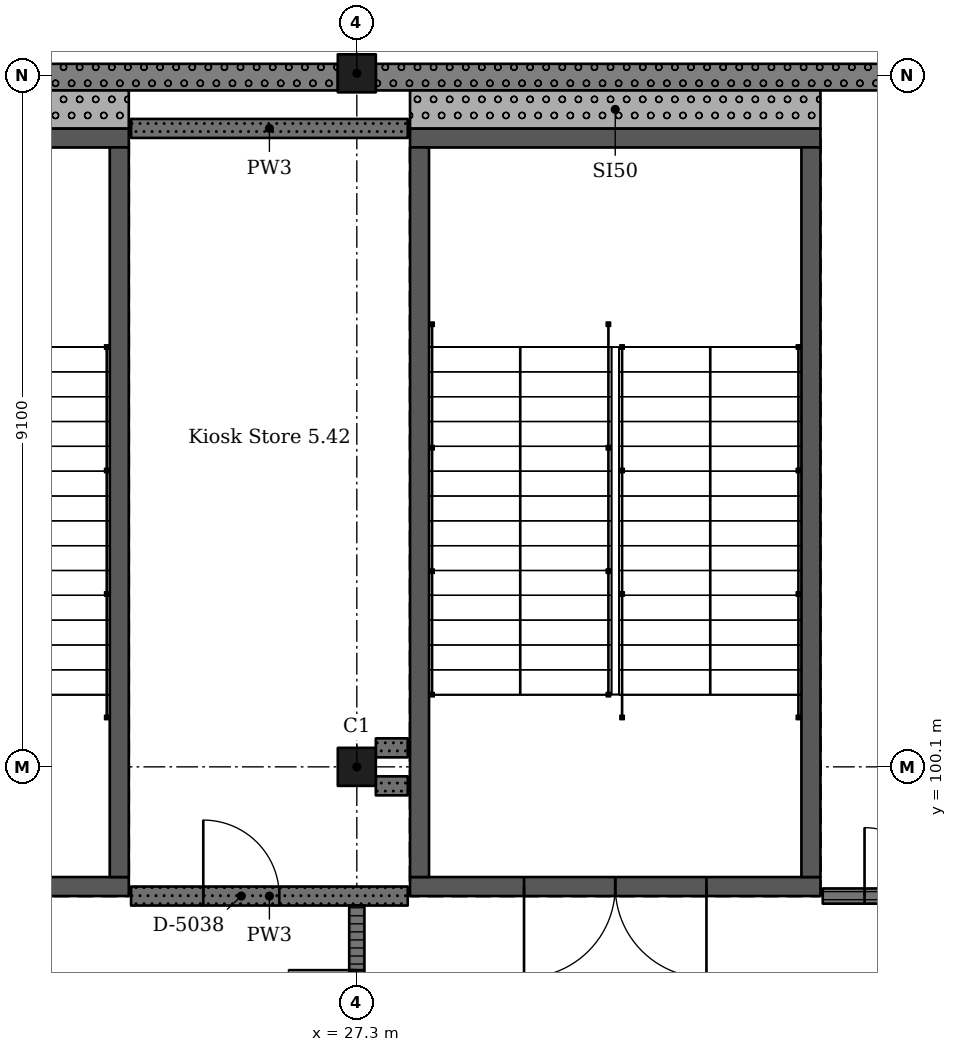
"""IFC4 building model, lengths in metres.
Left out: names, types, materials, properties, quantities, classifications, styles, units other than length and angle.
Written with IfcOpenShell. Run it as: python <this file> out.ifc"""

import sys

from ifc_helpers import new_model, si_unit, direction, frame, frame_2d, origin, origin_2d, place, context, subcontext, project, spatial, rectangle, extrude, element, fill, save


model = new_model("IFC4")
c1 = context("Model", 3, precision=1e-05, world=origin(), true_north=direction((0.0, 1.0)))
c2 = subcontext(c1, "Body", "Model", "MODEL_VIEW")
j1 = project(units=[si_unit("LENGTHUNIT", "METRE"), si_unit("PLANEANGLEUNIT", "RADIAN")], contexts=[c1])
p1 = place(None, origin())
s1 = spatial("IfcSite", under=j1, at=p1, CompositionType="ELEMENT")
p2 = place(p1, origin())
s2 = spatial("IfcBuilding", under=s1, at=p2, CompositionType="ELEMENT")
p3 = place(p2, frame((0.0, 0.0, 24.57)))
s3 = spatial("IfcBuildingStorey", under=s2, at=p3, CompositionType="ELEMENT", Elevation=24.57)
for number, where, z_axis, x_axis in (
    (1, (27.3, 100.1, 0.0), (0.0, 0.0, 1.0), (1.0, 0.0, 0.0)),
    (2, (27.3, 109.225, 0.0), (0.0, 0.0, 1.0), (1.0, 0.0, 0.0)),
):
    element("IfcColumn", number, at=place(p3, frame(where, z_axis=z_axis, x_axis=x_axis)), inside=s3, PredefinedType="COLUMN", context=c2, shape_type="SweptSolid", body=[
        extrude(rectangle(XDim=0.5, YDim=0.5, at=origin_2d()), origin(), (0.0, 0.0, 1.0), 4.55),
    ])
p4 = place(p3, frame((24.3, 98.525, 0.0), z_axis=(0.0, 0.0, 1.0), x_axis=(-1.0, 0.0, 0.0)))
e3 = element("IfcWall", 3, at=p4, inside=s3, PredefinedType="SHEAR", context=c2, shape_type="SweptSolid", body=[
    extrude(rectangle(XDim=5.4, YDim=0.25, at=frame_2d((2.7, 0.0))), origin(), (0.0, 0.0, 1.0), 4.55),
])
p5 = place(p4, frame((1.5, 0.0, 0.0)))
e4 = element("IfcOpeningElement", 4, at=p5, cuts=e3, PredefinedType="OPENING", context=c2, shape_type="SweptSolid", body=[
    extrude(rectangle(XDim=2.4, YDim=2.1, at=frame_2d((1.2, 1.05))), frame((0.0, 0.135, 0.0), z_axis=(0.0, -1.0, 0.0), x_axis=(1.0, 0.0, 0.0)), (0.0, 0.0, 1.0), 0.27),
])
p6 = place(p3, frame((24.3, 108.375, 0.0), z_axis=(0.0, 0.0, 1.0), x_axis=(-1.0, 0.0, 0.0)))
e5 = element("IfcWall", 5, at=p6, inside=s3, PredefinedType="SHEAR", context=c2, shape_type="SweptSolid", body=[
    extrude(rectangle(XDim=5.4, YDim=0.25, at=frame_2d((2.7, 0.0))), origin(), (0.0, 0.0, 1.0), 4.55),
])
p7 = place(p3, frame((24.175, 108.25, 0.0), z_axis=(0.0, 0.0, 1.0), x_axis=(0.0, -1.0, 0.0)))
e6 = element("IfcWall", 6, at=p7, inside=s3, PredefinedType="SHEAR", context=c2, shape_type="SweptSolid", body=[
    extrude(rectangle(XDim=9.6, YDim=0.25, at=frame_2d((4.8, 0.0))), origin(), (0.0, 0.0, 1.0), 4.55),
])
p8 = place(p3, frame((33.4, 98.525, 0.0), z_axis=(0.0, 0.0, 1.0), x_axis=(-1.0, 0.0, 0.0)))
e7 = element("IfcWall", 7, at=p8, inside=s3, PredefinedType="SHEAR", context=c2, shape_type="SweptSolid", body=[
    extrude(rectangle(XDim=5.4, YDim=0.25, at=frame_2d((2.7, 0.0))), origin(), (0.0, 0.0, 1.0), 4.55),
])
p9 = place(p8, frame((1.5, 0.0, 0.0)))
e8 = element("IfcOpeningElement", 8, at=p9, cuts=e7, PredefinedType="OPENING", context=c2, shape_type="SweptSolid", body=[
    extrude(rectangle(XDim=2.4, YDim=2.1, at=frame_2d((1.2, 1.05))), frame((0.0, 0.135, 0.0), z_axis=(0.0, -1.0, 0.0), x_axis=(1.0, 0.0, 0.0)), (0.0, 0.0, 1.0), 0.27),
])
p10 = place(p3, frame((33.4, 108.375, 0.0), z_axis=(0.0, 0.0, 1.0), x_axis=(-1.0, 0.0, 0.0)))
e9 = element("IfcWall", 9, at=p10, inside=s3, PredefinedType="SHEAR", context=c2, shape_type="SweptSolid", body=[
    extrude(rectangle(XDim=5.4, YDim=0.25, at=frame_2d((2.7, 0.0))), origin(), (0.0, 0.0, 1.0), 4.55),
])
for number, where, z_axis, x_axis in (
    (10, (28.125, 108.25, 0.0), (0.0, 0.0, 1.0), (0.0, -1.0, 0.0)),
    (11, (33.275, 108.25, 0.0), (0.0, 0.0, 1.0), (0.0, -1.0, 0.0)),
):
    element("IfcWall", number, at=place(p3, frame(where, z_axis=z_axis, x_axis=x_axis)), inside=s3, PredefinedType="SHEAR", context=c2, shape_type="SweptSolid", body=[
        extrude(rectangle(XDim=9.6, YDim=0.25, at=frame_2d((4.8, 0.0))), origin(), (0.0, 0.0, 1.0), 4.55),
    ])
p11 = place(p3, frame((36.15, 109.175, 0.0), z_axis=(0.0, 0.0, 1.0), x_axis=(-1.0, 0.0, 0.0)))
e12 = element("IfcWall", 12, at=p11, inside=s3, PredefinedType="SOLIDWALL", context=c2, shape_type="SweptSolid", body=[
    extrude(rectangle(XDim=8.6, YDim=0.35, at=frame_2d((4.3, 0.0))), origin(), (0.0, 0.0, 1.0), 3.6),
])
p12 = place(p3, frame((27.05, 109.175, 0.0), z_axis=(0.0, 0.0, 1.0), x_axis=(-1.0, 0.0, 0.0)))
e13 = element("IfcWall", 13, at=p12, inside=s3, PredefinedType="SOLIDWALL", context=c2, shape_type="SweptSolid", body=[
    extrude(rectangle(XDim=8.6, YDim=0.35, at=frame_2d((4.3, 0.0))), origin(), (0.0, 0.0, 1.0), 3.6),
])
p13 = place(p3, frame((18.9, 108.75, 0.0), z_axis=(0.0, 0.0, 1.0), x_axis=(1.0, 0.0, 0.0)))
e14 = element("IfcWall", 14, at=p13, inside=s3, PredefinedType="SOLIDWALL", context=c2, shape_type="SweptSolid", body=[
    extrude(rectangle(XDim=5.4, YDim=0.5, at=frame_2d((2.7, 0.0))), origin(), (0.0, 0.0, 1.0), 4.35),
])
p14 = place(p3, frame((28.0, 108.75, 0.0), z_axis=(0.0, 0.0, 1.0), x_axis=(1.0, 0.0, 0.0)))
e15 = element("IfcWall", 15, at=p14, inside=s3, PredefinedType="SOLIDWALL", context=c2, shape_type="SweptSolid", body=[
    extrude(rectangle(XDim=5.4, YDim=0.5, at=frame_2d((2.7, 0.0))), origin(), (0.0, 0.0, 1.0), 4.35),
])
p15 = place(p3, frame((24.33, 98.4, 0.0), z_axis=(0.0, 0.0, 1.0), x_axis=(1.0, 0.0, 0.0)))
e16 = element("IfcWall", 16, at=p15, inside=s3, PredefinedType="SOLIDWALL", context=c2, shape_type="SweptSolid", body=[
    extrude(rectangle(XDim=3.64, YDim=0.25, at=frame_2d((1.82, 0.0))), origin(), (0.0, 0.0, 1.0), 4.35),
])
p16 = place(p15, frame((0.95, 0.0, 0.0)))
e17 = element("IfcOpeningElement", 17, at=p16, cuts=e16, PredefinedType="OPENING", context=c2, shape_type="SweptSolid", body=[
    extrude(rectangle(XDim=1.0, YDim=2.1, at=frame_2d((0.5, 1.05))), frame((0.0, 0.135, 0.0), z_axis=(0.0, -1.0, 0.0), x_axis=(1.0, 0.0, 0.0)), (0.0, 0.0, 1.0), 0.27),
])
p17 = place(p3, frame((24.33, 108.5, 0.0), z_axis=(0.0, 0.0, 1.0), x_axis=(1.0, 0.0, 0.0)))
e18 = element("IfcWall", 18, at=p17, inside=s3, PredefinedType="SOLIDWALL", context=c2, shape_type="SweptSolid", body=[
    extrude(rectangle(XDim=3.64, YDim=0.25, at=frame_2d((1.82, 0.0))), origin(), (0.0, 0.0, 1.0), 4.35),
])
p18 = place(p3, frame((27.3, 98.275, 0.0), z_axis=(0.0, 0.0, 1.0), x_axis=(0.0, -1.0, 0.0)))
e19 = element("IfcWall", 19, at=p18, inside=s3, PredefinedType="PARTITIONING", context=c2, shape_type="SweptSolid", body=[
    extrude(rectangle(XDim=7.025, YDim=0.2, at=frame_2d((3.512, 0.0))), origin(), (0.0, 0.0, 1.0), 3.6),
])
p19 = place(p18, frame((0.85, 0.0, 0.0)))
e20 = element("IfcOpeningElement", 20, at=p19, cuts=e19, PredefinedType="OPENING", context=c2, shape_type="SweptSolid", body=[
    extrude(rectangle(XDim=1.8, YDim=2.4, at=frame_2d((0.9, 1.2))), frame((0.0, 0.11, 0.0), z_axis=(0.0, -1.0, 0.0), x_axis=(1.0, 0.0, 0.0)), (0.0, 0.0, 1.0), 0.22),
])
p20 = place(p18, frame((4.35, 0.0, 0.0)))
e21 = element("IfcOpeningElement", 21, at=p20, cuts=e19, PredefinedType="OPENING", context=c2, shape_type="SweptSolid", body=[
    extrude(rectangle(XDim=1.8, YDim=2.4, at=frame_2d((0.9, 1.2))), frame((0.0, 0.11, 0.0), z_axis=(0.0, -1.0, 0.0), x_axis=(1.0, 0.0, 0.0)), (0.0, 0.0, 1.0), 0.22),
])
for number, where, z_axis, x_axis in (
    (22, (27.55, 99.85, 0.0), (0.0, 0.0, 1.0), (1.0, 0.0, 0.0)),
    (23, (27.97, 100.35, 0.0), (0.0, 0.0, 1.0), (-1.0, 0.0, 0.0)),
):
    element("IfcWall", number, at=place(p3, frame(where, z_axis=z_axis, x_axis=x_axis)), inside=s3, PredefinedType="SOLIDWALL", context=c2, shape_type="SweptSolid", body=[
        extrude(rectangle(XDim=0.42, YDim=0.25, at=frame_2d((0.21, 0.0))), origin(), (0.0, 0.0, 1.0), 4.35),
    ])
p21 = place(p3, frame((33.43, 98.4, 0.0), z_axis=(0.0, 0.0, 1.0), x_axis=(1.0, 0.0, 0.0)))
e24 = element("IfcWall", 24, at=p21, inside=s3, PredefinedType="PARTITIONING", context=c2, shape_type="SweptSolid", body=[
    extrude(rectangle(XDim=2.82, YDim=0.2, at=frame_2d((1.41, 0.0))), origin(), (0.0, 0.0, 1.0), 4.35),
])
p22 = place(p21, frame((0.55, 0.0, 0.0)))
e25 = element("IfcOpeningElement", 25, at=p22, cuts=e24, PredefinedType="OPENING", context=c2, shape_type="SweptSolid", body=[
    extrude(rectangle(XDim=1.8, YDim=2.4, at=frame_2d((0.9, 1.2))), frame((0.0, 0.11, 0.0), z_axis=(0.0, -1.0, 0.0), x_axis=(1.0, 0.0, 0.0)), (0.0, 0.0, 1.0), 0.22),
])
p23 = place(p16, origin())
e26 = element("IfcDoor", 26, at=p23, inside=s3, OperationType="SINGLE_SWING_RIGHT", PredefinedType="DOOR", context=c2, shape_type="SweptSolid", body=[
    extrude(rectangle(XDim=1.0, YDim=2.1, at=frame_2d((0.5, 1.05))), frame((0.0, 0.025, 0.0), z_axis=(0.0, -1.0, 0.0), x_axis=(1.0, 0.0, 0.0)), (0.0, 0.0, 1.0), 0.05),
])
fill(e17, e26)
p24 = place(p19, origin())
e27 = element("IfcDoor", 27, at=p24, inside=s3, OperationType="DOUBLE_DOOR_SINGLE_SWING", PredefinedType="DOOR", context=c2, shape_type="SweptSolid", body=[
    extrude(rectangle(XDim=1.8, YDim=2.4, at=frame_2d((0.9, 1.2))), frame((0.0, 0.025, 0.0), z_axis=(0.0, -1.0, 0.0), x_axis=(1.0, 0.0, 0.0)), (0.0, 0.0, 1.0), 0.05),
])
fill(e20, e27)
p25 = place(p22, origin())
e28 = element("IfcDoor", 28, at=p25, inside=s3, OperationType="DOUBLE_DOOR_SINGLE_SWING", PredefinedType="DOOR", context=c2, shape_type="SweptSolid", body=[
    extrude(rectangle(XDim=1.8, YDim=2.4, at=frame_2d((0.9, 1.2))), frame((0.0, 0.025, 0.0), z_axis=(0.0, -1.0, 0.0), x_axis=(1.0, 0.0, 0.0)), (0.0, 0.0, 1.0), 0.05),
])
fill(e25, e28)
p26 = place(p9, origin())
e29 = element("IfcDoor", 29, at=p26, inside=s3, OperationType="DOUBLE_DOOR_SINGLE_SWING", PredefinedType="DOOR", context=c2, shape_type="SweptSolid", body=[
    extrude(rectangle(XDim=2.4, YDim=2.1, at=frame_2d((1.2, 1.05))), frame((0.0, 0.025, 0.0), z_axis=(0.0, -1.0, 0.0), x_axis=(1.0, 0.0, 0.0)), (0.0, 0.0, 1.0), 0.05),
])
fill(e8, e29)
save(model, sys.argv[1])
